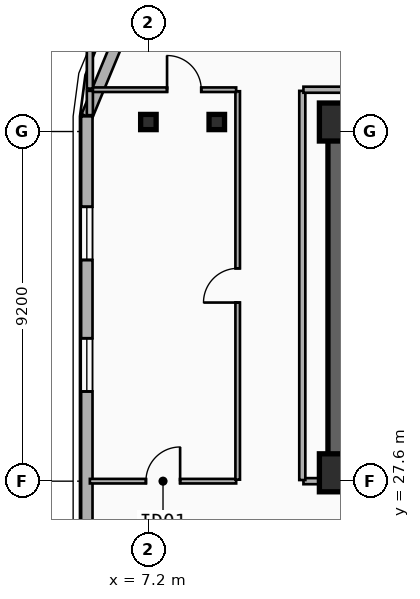
"""IFC4 building model, lengths in metres.
Left out: names, types, materials, properties, quantities, classifications, styles, units other than length and angle.
Written with IfcOpenShell. Run it as: python <this file> out.ifc"""

import sys

from ifc_helpers import new_model, si_unit, direction, frame, frame_2d, origin, origin_2d, place, context, subcontext, project, spatial, rectangle, i_section, extrude, element, fill, save


model = new_model("IFC4")
c1 = context("Model", 3, precision=1e-05, world=origin(), true_north=direction((0.0, 1.0)))
c2 = subcontext(c1, "Body", "Model", "MODEL_VIEW")
j1 = project(units=[si_unit("LENGTHUNIT", "METRE"), si_unit("PLANEANGLEUNIT", "RADIAN")], contexts=[c1])
p1 = place(None, origin())
s1 = spatial("IfcSite", under=j1, at=p1, CompositionType="ELEMENT")
p2 = place(p1, origin())
s2 = spatial("IfcBuilding", under=s1, at=p2, CompositionType="ELEMENT")
p3 = place(p2, frame((0.0, 0.0, 225.6)))
s3 = spatial("IfcBuildingStorey", under=s2, at=p3, CompositionType="ELEMENT", Elevation=225.6)
p4 = place(p3, frame((12.15, 37.05, 0.0), z_axis=(0.0, 0.0, 1.0), x_axis=(1.0, 0.0, 0.0)))
e1 = element("IfcWall", 1, at=p4, inside=s3, PredefinedType="SHEAR", context=c2, shape_type="SweptSolid", body=[
    extrude(rectangle(XDim=33.23, YDim=0.45, at=frame_2d((16.615, 0.0))), origin(), (0.0, 0.0, 1.0), 3.6),
])
p5 = place(p3, frame((21.18, 27.82, 0.0), z_axis=(0.0, 0.0, 1.0), x_axis=(-1.0, 0.0, 0.0)))
e2 = element("IfcWall", 2, at=p5, inside=s3, PredefinedType="SHEAR", context=c2, shape_type="SweptSolid", body=[
    extrude(rectangle(XDim=9.03, YDim=0.45, at=frame_2d((4.515, 0.0))), origin(), (0.0, 0.0, 1.0), 3.6),
])
p6 = place(p5, frame((2.68, 0.0, 0.0)))
e3 = element("IfcOpeningElement", 3, at=p6, cuts=e2, PredefinedType="OPENING", context=c2, shape_type="SweptSolid", body=[
    extrude(rectangle(XDim=1.1, YDim=2.15, at=frame_2d((0.55, 1.075))), frame((0.0, 0.235, 0.0), z_axis=(0.0, -1.0, 0.0), x_axis=(1.0, 0.0, 0.0)), (0.0, 0.0, 1.0), 0.47),
])
p7 = place(p3, frame((12.15, 28.045, 0.0), z_axis=(0.0, 0.0, 1.0), x_axis=(0.0, 1.0, 0.0)))
e4 = element("IfcWall", 4, at=p7, inside=s3, PredefinedType="SHEAR", context=c2, shape_type="SweptSolid", body=[
    extrude(rectangle(XDim=8.78, YDim=0.45, at=frame_2d((4.39, 0.0))), origin(), (0.0, 0.0, 1.0), 3.6),
])
for number, where, z_axis, x_axis in (
    (5, (12.2, 27.82, 0.0), (0.0, 0.0, 1.0), (1.0, 0.0, 0.0)),
    (6, (12.2, 37.05, 0.0), (0.0, 0.0, 1.0), (1.0, 0.0, 0.0)),
):
    element("IfcColumn", number, at=place(p3, frame(where, z_axis=z_axis, x_axis=x_axis)), inside=s3, PredefinedType="COLUMN", context=c2, shape_type="SweptSolid", body=[
        extrude(rectangle(XDim=1.0, YDim=1.0, at=origin_2d()), origin(), (0.0, 0.0, 1.0), 3.6),
    ])
for number, where, z_axis, x_axis in (
    (7, (9.0, 37.05, 0.0), (0.0, 0.0, 1.0), (1.0, 0.0, 0.0)),
    (8, (7.2, 37.05, 0.0), (0.0, 0.0, 1.0), (1.0, 0.0, 0.0)),
):
    element("IfcColumn", number, at=place(p3, frame(where, z_axis=z_axis, x_axis=x_axis)), inside=s3, PredefinedType="COLUMN", context=c2, shape_type="SweptSolid", body=[
        extrude(i_section(OverallWidth=0.408, OverallDepth=0.4, WebThickness=0.025, FlangeThickness=0.039, FilletRadius=0.015, at=origin_2d()), origin(), (0.0, 0.0, 1.0), 3.6),
    ])
p8 = place(p3, frame((5.58, 37.2, 0.0), z_axis=(0.0, 0.0, 1.0), x_axis=(0.382636798336, 0.92389884758, 0.0)))
e9 = element("IfcWall", 9, at=p8, inside=s3, PredefinedType="SOLIDWALL", context=c2, shape_type="SweptSolid", body=[
    extrude(rectangle(XDim=3.077, YDim=0.3, at=frame_2d((1.538, 0.0))), origin(), (0.0, 0.0, 1.0), 3.34),
])
p9 = place(p3, frame((5.58, 8.6, 0.0), z_axis=(0.0, 0.0, 1.0), x_axis=(0.0, 1.0, 0.0)))
e10 = element("IfcWall", 10, at=p9, inside=s3, PredefinedType="SOLIDWALL", context=c2, shape_type="SweptSolid", body=[
    extrude(rectangle(XDim=28.6, YDim=0.3, at=frame_2d((14.3, 0.0))), origin(), (0.0, 0.0, 1.0), 3.34),
])
p10 = place(p9, frame((21.36, 0.0, 0.34)))
e11 = element("IfcOpeningElement", 11, at=p10, cuts=e10, PredefinedType="OPENING", context=c2, shape_type="SweptSolid", body=[
    extrude(rectangle(XDim=1.4, YDim=2.1, at=frame_2d((0.7, 1.05))), frame((0.0, 0.16, 0.0), z_axis=(0.0, -1.0, 0.0), x_axis=(1.0, 0.0, 0.0)), (0.0, 0.0, 1.0), 0.32),
])
p11 = place(p9, frame((24.82, 0.0, 0.34)))
e12 = element("IfcOpeningElement", 12, at=p11, cuts=e10, PredefinedType="OPENING", context=c2, shape_type="SweptSolid", body=[
    extrude(rectangle(XDim=1.4, YDim=2.1, at=frame_2d((0.7, 1.05))), frame((0.0, 0.16, 0.0), z_axis=(0.0, -1.0, 0.0), x_axis=(1.0, 0.0, 0.0)), (0.0, 0.0, 1.0), 0.32),
])
p12 = place(p9, frame((2.671, 0.0, 0.34)))
e13 = element("IfcOpeningElement", 13, at=p12, cuts=e10, PredefinedType="OPENING", context=c2, shape_type="SweptSolid", body=[
    extrude(rectangle(XDim=1.4, YDim=2.1, at=frame_2d((0.7, 1.05))), frame((0.0, 0.16, 0.0), z_axis=(0.0, -1.0, 0.0), x_axis=(1.0, 0.0, 0.0)), (0.0, 0.0, 1.0), 0.32),
])
p13 = place(p9, frame((6.679, 0.0, 0.34)))
e14 = element("IfcOpeningElement", 14, at=p13, cuts=e10, PredefinedType="OPENING", context=c2, shape_type="SweptSolid", body=[
    extrude(rectangle(XDim=1.4, YDim=2.1, at=frame_2d((0.7, 1.05))), frame((0.0, 0.16, 0.0), z_axis=(0.0, -1.0, 0.0), x_axis=(1.0, 0.0, 0.0)), (0.0, 0.0, 1.0), 0.32),
])
p14 = place(p9, frame((10.467, 0.0, 0.34)))
e15 = element("IfcOpeningElement", 15, at=p14, cuts=e10, PredefinedType="OPENING", context=c2, shape_type="SweptSolid", body=[
    extrude(rectangle(XDim=1.4, YDim=2.1, at=frame_2d((0.7, 1.05))), frame((0.0, 0.16, 0.0), z_axis=(0.0, -1.0, 0.0), x_axis=(1.0, 0.0, 0.0)), (0.0, 0.0, 1.0), 0.32),
])
p15 = place(p9, frame((14.256, 0.0, 0.34)))
e16 = element("IfcOpeningElement", 16, at=p15, cuts=e10, PredefinedType="OPENING", context=c2, shape_type="SweptSolid", body=[
    extrude(rectangle(XDim=1.4, YDim=2.1, at=frame_2d((0.7, 1.05))), frame((0.0, 0.16, 0.0), z_axis=(0.0, -1.0, 0.0), x_axis=(1.0, 0.0, 0.0)), (0.0, 0.0, 1.0), 0.32),
])
p16 = place(p3, frame((5.66, 27.6, 0.0), z_axis=(0.0, 0.0, 1.0), x_axis=(1.0, 0.0, 0.0)))
e17 = element("IfcWall", 17, at=p16, inside=s3, PredefinedType="PARTITIONING", context=c2, shape_type="SweptSolid", body=[
    extrude(rectangle(XDim=3.85, YDim=0.12, at=frame_2d((1.925, 0.0))), origin(), (0.0, 0.0, 1.0), 2.67),
])
p17 = place(p16, frame((1.475, 0.0, 0.0)))
e18 = element("IfcOpeningElement", 18, at=p17, cuts=e17, PredefinedType="OPENING", context=c2, shape_type="SweptSolid", body=[
    extrude(rectangle(XDim=0.9, YDim=2.1, at=frame_2d((0.45, 1.05))), frame((0.0, 0.07, 0.0), z_axis=(0.0, -1.0, 0.0), x_axis=(1.0, 0.0, 0.0)), (0.0, 0.0, 1.0), 0.14),
])
p18 = place(p3, frame((9.55, 27.64, 0.0), z_axis=(0.0, 0.0, 1.0), x_axis=(0.0, 1.0, 0.0)))
e19 = element("IfcWall", 19, at=p18, inside=s3, PredefinedType="PARTITIONING", context=c2, shape_type="SweptSolid", body=[
    extrude(rectangle(XDim=10.22, YDim=0.12, at=frame_2d((5.11, 0.0))), origin(), (0.0, 0.0, 1.0), 2.82),
])
p19 = place(p18, frame((4.66, 0.0, 0.0)))
e20 = element("IfcOpeningElement", 20, at=p19, cuts=e19, PredefinedType="OPENING", context=c2, shape_type="SweptSolid", body=[
    extrude(rectangle(XDim=0.9, YDim=2.1, at=frame_2d((0.45, 1.05))), frame((0.0, 0.07, 0.0), z_axis=(0.0, -1.0, 0.0), x_axis=(1.0, 0.0, 0.0)), (0.0, 0.0, 1.0), 0.14),
])
p20 = place(p3, frame((5.66, 37.9, 0.0), z_axis=(0.0, 0.0, 1.0), x_axis=(1.0, 0.0, 0.0)))
e21 = element("IfcWall", 21, at=p20, inside=s3, PredefinedType="PARTITIONING", context=c2, shape_type="SweptSolid", body=[
    extrude(rectangle(XDim=3.85, YDim=0.12, at=frame_2d((1.925, 0.0))), origin(), (0.0, 0.0, 1.0), 3.34),
])
p21 = place(p20, frame((2.031, 0.0, 0.0)))
e22 = element("IfcOpeningElement", 22, at=p21, cuts=e21, PredefinedType="OPENING", context=c2, shape_type="SweptSolid", body=[
    extrude(rectangle(XDim=0.9, YDim=2.1, at=frame_2d((0.45, 1.05))), frame((0.0, 0.07, 0.0), z_axis=(0.0, -1.0, 0.0), x_axis=(1.0, 0.0, 0.0)), (0.0, 0.0, 1.0), 0.14),
])
p22 = place(p3, frame((11.28, 27.6, 0.0), z_axis=(0.0, 0.0, 1.0), x_axis=(1.0, 0.0, 0.0)))
e23 = element("IfcWall", 23, at=p22, inside=s3, PredefinedType="PARTITIONING", context=c2, shape_type="SweptSolid", body=[
    extrude(rectangle(XDim=0.84, YDim=0.16, at=frame_2d((0.42, 0.0))), origin(), (0.0, 0.0, 1.0), 2.41),
])
p23 = place(p3, frame((11.25, 27.63, 0.0), z_axis=(0.0, 0.0, 1.0), x_axis=(0.0, 1.0, 0.0)))
e24 = element("IfcWall", 24, at=p23, inside=s3, PredefinedType="PARTITIONING", context=c2, shape_type="SweptSolid", body=[
    extrude(rectangle(XDim=10.24, YDim=0.16, at=frame_2d((5.12, 0.0))), origin(), (0.0, 0.0, 1.0), 2.82),
])
p24 = place(p3, frame((11.28, 37.9, 0.0), z_axis=(0.0, 0.0, 1.0), x_axis=(1.0, 0.0, 0.0)))
e25 = element("IfcWall", 25, at=p24, inside=s3, PredefinedType="PARTITIONING", context=c2, shape_type="SweptSolid", body=[
    extrude(rectangle(XDim=35.04, YDim=0.16, at=frame_2d((17.52, 0.0))), origin(), (0.0, 0.0, 1.0), 3.34),
])
p25 = place(p3, frame((5.66, 37.93, 0.0), z_axis=(0.0, 0.0, 1.0), x_axis=(0.0, 1.0, 0.0)))
e26 = element("IfcWall", 26, at=p25, inside=s3, PredefinedType="PARTITIONING", context=c2, shape_type="SweptSolid", body=[
    extrude(rectangle(XDim=1.44, YDim=0.16, at=frame_2d((0.72, 0.0))), origin(), (0.0, 0.0, 1.0), 3.34),
])
p26 = place(p3, frame((5.66, 37.23, 0.0), z_axis=(0.0, 0.0, 1.0), x_axis=(0.0, 1.0, 0.0)))
e27 = element("IfcWall", 27, at=p26, inside=s3, PredefinedType="PARTITIONING", context=c2, shape_type="SweptSolid", body=[
    extrude(rectangle(XDim=0.64, YDim=0.16, at=frame_2d((0.32, 0.0))), origin(), (0.0, 0.0, 1.0), 3.34),
])
p27 = place(p10, origin())
e28 = element("IfcWindow", 28, at=p27, inside=s3, PartitioningType="SINGLE_PANEL", PredefinedType="WINDOW", context=c2, shape_type="SweptSolid", body=[
    extrude(rectangle(XDim=1.4, YDim=2.1, at=frame_2d((0.7, 1.05))), frame((0.0, 0.03, 0.0), z_axis=(0.0, -1.0, 0.0), x_axis=(1.0, 0.0, 0.0)), (0.0, 0.0, 1.0), 0.06),
])
fill(e11, e28)
p28 = place(p11, origin())
e29 = element("IfcWindow", 29, at=p28, inside=s3, PartitioningType="SINGLE_PANEL", PredefinedType="WINDOW", context=c2, shape_type="SweptSolid", body=[
    extrude(rectangle(XDim=1.4, YDim=2.1, at=frame_2d((0.7, 1.05))), frame((0.0, 0.03, 0.0), z_axis=(0.0, -1.0, 0.0), x_axis=(1.0, 0.0, 0.0)), (0.0, 0.0, 1.0), 0.06),
])
fill(e12, e29)
p29 = place(p17, origin())
e30 = element("IfcDoor", 30, at=p29, inside=s3, OperationType="SINGLE_SWING_RIGHT", PredefinedType="DOOR", context=c2, shape_type="SweptSolid", body=[
    extrude(rectangle(XDim=0.9, YDim=2.1, at=frame_2d((0.45, 1.05))), frame((0.0, 0.025, 0.0), z_axis=(0.0, -1.0, 0.0), x_axis=(1.0, 0.0, 0.0)), (0.0, 0.0, 1.0), 0.05),
])
fill(e18, e30)
p30 = place(p19, origin())
e31 = element("IfcDoor", 31, at=p30, inside=s3, OperationType="SINGLE_SWING_LEFT", PredefinedType="DOOR", context=c2, shape_type="SweptSolid", body=[
    extrude(rectangle(XDim=0.9, YDim=2.1, at=frame_2d((0.45, 1.05))), frame((0.0, 0.025, 0.0), z_axis=(0.0, -1.0, 0.0), x_axis=(1.0, 0.0, 0.0)), (0.0, 0.0, 1.0), 0.05),
])
fill(e20, e31)
p31 = place(p21, origin())
e32 = element("IfcDoor", 32, at=p31, inside=s3, OperationType="SINGLE_SWING_LEFT", PredefinedType="DOOR", context=c2, shape_type="SweptSolid", body=[
    extrude(rectangle(XDim=0.9, YDim=2.1, at=frame_2d((0.45, 1.05))), frame((0.0, 0.025, 0.0), z_axis=(0.0, -1.0, 0.0), x_axis=(1.0, 0.0, 0.0)), (0.0, 0.0, 1.0), 0.05),
])
fill(e22, e32)
save(model, sys.argv[1])
